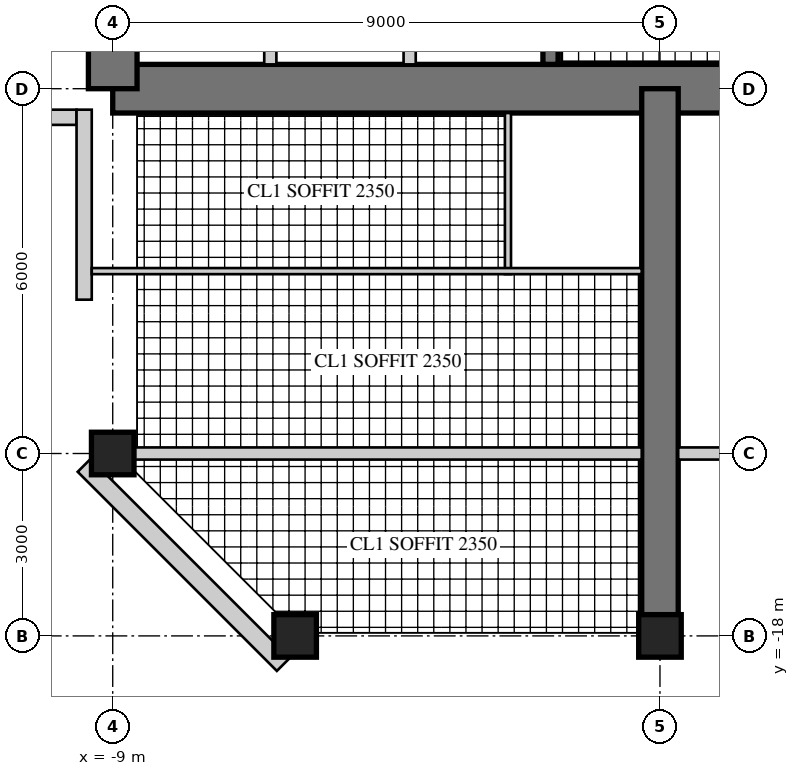
"""IFC4 building model, lengths in metres.
Left out: names, types, materials, properties, quantities, classifications, styles, units other than length and angle.
Written with IfcOpenShell. Run it as: python <this file> out.ifc"""

import sys

from ifc_helpers import new_model, si_unit, direction, frame, frame_2d, origin, origin_2d, place, context, subcontext, project, spatial, rectangle, hollow_rectangle, extrude, element, fill, save


model = new_model("IFC4")
c1 = context("Model", 3, precision=1e-05, world=origin(), true_north=direction((0.0, 1.0)))
c2 = subcontext(c1, "Body", "Model", "MODEL_VIEW")
j1 = project(units=[si_unit("LENGTHUNIT", "METRE"), si_unit("PLANEANGLEUNIT", "RADIAN")], contexts=[c1])
p1 = place(None, origin())
s1 = spatial("IfcSite", under=j1, at=p1, CompositionType="ELEMENT")
p2 = place(p1, origin())
s2 = spatial("IfcBuilding", under=s1, at=p2, CompositionType="ELEMENT")
p3 = place(p2, frame((0.0, 0.0, 261.1)))
s3 = spatial("IfcBuildingStorey", under=s2, at=p3, CompositionType="ELEMENT", Elevation=261.1)
p4 = place(p3, frame((-9.0, -9.0, 0.0), z_axis=(0.0, 0.0, 1.0), x_axis=(1.0, 0.0, 0.0)))
e1 = element("IfcWall", 1, at=p4, inside=s3, PredefinedType="SHEAR", context=c2, shape_type="SweptSolid", body=[
    extrude(rectangle(XDim=18.0, YDim=0.8, at=frame_2d((9.0, 0.0))), origin(), (0.0, 0.0, 1.0), 3.4),
])
p5 = place(p4, frame((9.8, 0.0, 0.0)))
e2 = element("IfcOpeningElement", 2, at=p5, cuts=e1, PredefinedType="OPENING", context=c2, shape_type="SweptSolid", body=[
    extrude(rectangle(XDim=1.0, YDim=2.4, at=frame_2d((0.5, 1.2))), frame((0.0, 0.41, 0.0), z_axis=(0.0, -1.0, 0.0), x_axis=(1.0, 0.0, 0.0)), (0.0, 0.0, 1.0), 0.82),
])
p6 = place(p3, frame((-9.0, 9.0, 0.0), z_axis=(0.0, 0.0, 1.0), x_axis=(0.0, -1.0, 0.0)))
e3 = element("IfcWall", 3, at=p6, inside=s3, PredefinedType="SHEAR", context=c2, shape_type="SweptSolid", body=[
    extrude(rectangle(XDim=18.0, YDim=0.8, at=frame_2d((9.0, 0.0))), origin(), (0.0, 0.0, 1.0), 3.4),
])
p7 = place(p6, frame((9.8, 0.0, 0.0)))
e4 = element("IfcOpeningElement", 4, at=p7, cuts=e3, PredefinedType="OPENING", context=c2, shape_type="SweptSolid", body=[
    extrude(rectangle(XDim=1.0, YDim=2.4, at=frame_2d((0.5, 1.2))), frame((0.0, 0.41, 0.0), z_axis=(0.0, -1.0, 0.0), x_axis=(1.0, 0.0, 0.0)), (0.0, 0.0, 1.0), 0.82),
])
p8 = place(p3, frame((-1.8, -1.875, 0.0), z_axis=(0.0, 0.0, 1.0), x_axis=(0.0, -1.0, 0.0)))
e5 = element("IfcWall", 5, at=p8, inside=s3, PredefinedType="SHEAR", context=c2, shape_type="SweptSolid", body=[
    extrude(rectangle(XDim=6.725, YDim=0.25, at=frame_2d((3.363, 0.0))), origin(), (0.0, 0.0, 1.0), 3.4),
])
p9 = place(p8, frame((1.875, 0.0, 0.0)))
e6 = element("IfcOpeningElement", 6, at=p9, cuts=e5, PredefinedType="OPENING", context=c2, shape_type="SweptSolid", body=[
    extrude(rectangle(XDim=1.6, YDim=2.4, at=frame_2d((0.8, 1.2))), frame((0.0, 0.135, 0.0), z_axis=(0.0, -1.0, 0.0), x_axis=(1.0, 0.0, 0.0)), (0.0, 0.0, 1.0), 0.27),
])
for number, where, z_axis, x_axis in (
    (7, (-4.117, -5.975, 0.0), (0.0, 0.0, 1.0), (0.0, -1.0, 0.0)),
    (8, (-6.408, -5.975, 0.0), (0.0, 0.0, 1.0), (0.0, -1.0, 0.0)),
):
    element("IfcWall", number, at=place(p3, frame(where, z_axis=z_axis, x_axis=x_axis)), inside=s3, PredefinedType="PARTITIONING", context=c2, shape_type="SweptSolid", body=[
        extrude(rectangle(XDim=2.625, YDim=0.2, at=frame_2d((1.312, 0.0))), origin(), (0.0, 0.0, 1.0), 3.4),
    ])
p10 = place(p3, frame((0.0, -9.0, 0.0), z_axis=(0.0, 0.0, 1.0), x_axis=(0.0, -1.0, 0.0)))
e9 = element("IfcWall", 9, at=p10, inside=s3, PredefinedType="SHEAR", context=c2, shape_type="SweptSolid", body=[
    extrude(rectangle(XDim=9.0, YDim=0.6, at=frame_2d((4.5, 0.0))), origin(), (0.0, 0.0, 1.0), 3.4),
])
p11 = place(p10, frame((3.8, 0.0, 0.0)))
e10 = element("IfcOpeningElement", 10, at=p11, cuts=e9, PredefinedType="OPENING", context=c2, shape_type="SweptSolid", body=[
    extrude(rectangle(XDim=1.0, YDim=2.15, at=frame_2d((0.5, 1.075))), frame((0.0, 0.31, 0.0), z_axis=(0.0, -1.0, 0.0), x_axis=(1.0, 0.0, 0.0)), (0.0, 0.0, 1.0), 0.62),
])
p12 = place(p10, frame((7.0, 0.0, 0.0)))
e11 = element("IfcOpeningElement", 11, at=p12, cuts=e9, PredefinedType="OPENING", context=c2, shape_type="SweptSolid", body=[
    extrude(rectangle(XDim=1.0, YDim=2.2, at=frame_2d((0.5, 1.1))), frame((0.0, 0.31, 0.0), z_axis=(0.0, -1.0, 0.0), x_axis=(1.0, 0.0, 0.0)), (0.0, 0.0, 1.0), 0.62),
])
for number, where, z_axis, x_axis in (
    (12, (-9.0, -15.0, 0.0), (0.0, 0.0, 1.0), (1.0, 0.0, 0.0)),
    (13, (-6.0, -18.0, 0.0), (0.0, 0.0, 1.0), (1.0, 0.0, 0.0)),
    (14, (0.0, -18.0, 0.0), (0.0, 0.0, 1.0), (1.0, 0.0, 0.0)),
):
    element("IfcColumn", number, at=place(p3, frame(where, z_axis=z_axis, x_axis=x_axis)), inside=s3, PredefinedType="COLUMN", context=c2, shape_type="SweptSolid", body=[
        extrude(rectangle(XDim=0.7, YDim=0.7, at=origin_2d()), origin(), (0.0, 0.0, 1.0), 3.4),
    ])
p13 = place(p3, frame((-12.47, -9.47, 0.0), z_axis=(0.0, 0.0, 1.0), x_axis=(1.0, 0.0, 0.0)))
e15 = element("IfcWall", 15, at=p13, inside=s3, PredefinedType="SOLIDWALL", context=c2, shape_type="SweptSolid", body=[
    extrude(rectangle(XDim=2.875, YDim=0.25, at=frame_2d((1.438, 0.0))), origin(), (0.0, 0.0, 1.0), 3.22),
])
p14 = place(p13, frame((0.6, 0.0, 0.0)))
e16 = element("IfcOpeningElement", 16, at=p14, cuts=e15, PredefinedType="OPENING", context=c2, shape_type="SweptSolid", body=[
    extrude(rectangle(XDim=1.0, YDim=2.2, at=frame_2d((0.5, 1.1))), frame((0.0, 0.135, 0.0), z_axis=(0.0, -1.0, 0.0), x_axis=(1.0, 0.0, 0.0)), (0.0, 0.0, 1.0), 0.27),
])
p15 = place(p3, frame((-9.47, -9.345, 0.0), z_axis=(0.0, 0.0, 1.0), x_axis=(0.0, -1.0, 0.0)))
e17 = element("IfcWall", 17, at=p15, inside=s3, PredefinedType="SOLIDWALL", context=c2, shape_type="SweptSolid", body=[
    extrude(rectangle(XDim=3.125, YDim=0.25, at=frame_2d((1.562, 0.0))), origin(), (0.0, 0.0, 1.0), 3.22),
])
p16 = place(p15, frame((0.6, 0.0, 0.0)))
e18 = element("IfcOpeningElement", 18, at=p16, cuts=e17, PredefinedType="OPENING", context=c2, shape_type="SweptSolid", body=[
    extrude(rectangle(XDim=1.0, YDim=2.2, at=frame_2d((0.5, 1.1))), frame((0.0, 0.135, 0.0), z_axis=(0.0, -1.0, 0.0), x_axis=(1.0, 0.0, 0.0)), (0.0, 0.0, 1.0), 0.27),
])
p17 = place(p3, frame((-9.47, -15.195, 0.0), z_axis=(0.0, 0.0, 1.0), x_axis=(0.707106781187, -0.707106781187, 0.0)))
e19 = element("IfcWall", 19, at=p17, inside=s3, PredefinedType="SOLIDWALL", context=c2, shape_type="SweptSolid", body=[
    extrude(rectangle(XDim=4.632, YDim=0.3, at=frame_2d((2.316, 0.0))), origin(), (0.0, 0.0, 1.0), 3.22),
])
p18 = place(p17, frame((1.866, 0.0, 0.3)))
e20 = element("IfcOpeningElement", 20, at=p18, cuts=e19, PredefinedType="OPENING", context=c2, shape_type="SweptSolid", body=[
    extrude(rectangle(XDim=0.9, YDim=2.4, at=frame_2d((0.45, 1.2))), frame((0.0, 0.16, 0.0), z_axis=(0.0, -1.0, 0.0), x_axis=(1.0, 0.0, 0.0)), (0.0, 0.0, 1.0), 0.32),
])
p19 = place(p3, frame((-2.5, -9.4, 0.0), z_axis=(0.0, 0.0, 1.0), x_axis=(0.0, -1.0, 0.0)))
e21 = element("IfcWall", 21, at=p19, inside=s3, PredefinedType="PARTITIONING", context=c2, shape_type="SweptSolid", body=[
    extrude(rectangle(XDim=2.65, YDim=0.1, at=frame_2d((1.325, 0.0))), origin(), (0.0, 0.0, 1.0), 3.22),
])
p20 = place(p3, frame((-9.345, -12.0, 0.0), z_axis=(0.0, 0.0, 1.0), x_axis=(1.0, 0.0, 0.0)))
e22 = element("IfcWall", 22, at=p20, inside=s3, PredefinedType="PARTITIONING", context=c2, shape_type="SweptSolid", body=[
    extrude(rectangle(XDim=9.045, YDim=0.1, at=frame_2d((4.522, 0.0))), origin(), (0.0, 0.0, 1.0), 3.22),
])
p21 = place(p20, frame((5.495, 0.0, 0.0)))
e23 = element("IfcOpeningElement", 23, at=p21, cuts=e22, PredefinedType="OPENING", context=c2, shape_type="SweptSolid", body=[
    extrude(rectangle(XDim=0.9, YDim=2.1, at=frame_2d((0.45, 1.05))), frame((0.0, 0.06, 0.0), z_axis=(0.0, -1.0, 0.0), x_axis=(1.0, 0.0, 0.0)), (0.0, 0.0, 1.0), 0.12),
])
p22 = place(p20, frame((7.595, 0.0, 0.0)))
e24 = element("IfcOpeningElement", 24, at=p22, cuts=e22, PredefinedType="OPENING", context=c2, shape_type="SweptSolid", body=[
    extrude(rectangle(XDim=0.9, YDim=2.1, at=frame_2d((0.45, 1.05))), frame((0.0, 0.06, 0.0), z_axis=(0.0, -1.0, 0.0), x_axis=(1.0, 0.0, 0.0)), (0.0, 0.0, 1.0), 0.12),
])
p23 = place(p3, frame((-8.65, -15.0, 0.0), z_axis=(0.0, 0.0, 1.0), x_axis=(1.0, 0.0, 0.0)))
e25 = element("IfcWall", 25, at=p23, inside=s3, PredefinedType="SOLIDWALL", context=c2, shape_type="SweptSolid", body=[
    extrude(rectangle(XDim=8.35, YDim=0.2, at=frame_2d((4.175, 0.0))), origin(), (0.0, 0.0, 1.0), 2.52),
])
p24 = place(p3, frame((0.3, -15.0, 0.0), z_axis=(0.0, 0.0, 1.0), x_axis=(1.0, 0.0, 0.0)))
e26 = element("IfcWall", 26, at=p24, inside=s3, PredefinedType="SOLIDWALL", context=c2, shape_type="SweptSolid", body=[
    extrude(rectangle(XDim=8.35, YDim=0.2, at=frame_2d((4.175, 0.0))), origin(), (0.0, 0.0, 1.0), 2.52),
])
p25 = place(p24, frame((0.4, 0.0, 0.0)))
e27 = element("IfcOpeningElement", 27, at=p25, cuts=e26, PredefinedType="OPENING", context=c2, shape_type="SweptSolid", body=[
    extrude(rectangle(XDim=1.0, YDim=2.2, at=frame_2d((0.5, 1.1))), frame((0.0, 0.11, 0.0), z_axis=(0.0, -1.0, 0.0), x_axis=(1.0, 0.0, 0.0)), (0.0, 0.0, 1.0), 0.22),
])
p26 = place(p16, origin())
e28 = element("IfcDoor", 28, at=p26, inside=s3, OperationType="SINGLE_SWING_LEFT", PredefinedType="DOOR", context=c2, shape_type="SweptSolid", body=[
    extrude(hollow_rectangle(XDim=1.0, YDim=2.2, WallThickness=0.06, at=frame_2d((0.5, 1.1))), frame((0.0, 0.025, 0.0), z_axis=(0.0, -1.0, 0.0), x_axis=(1.0, 0.0, 0.0)), (0.0, 0.0, 1.0), 0.05),
    extrude(rectangle(XDim=0.879, YDim=2.079, at=frame_2d((0.5, 1.1))), frame((0.0, 0.025, 0.0), z_axis=(0.0, -1.0, 0.0), x_axis=(1.0, 0.0, 0.0)), (0.0, 0.0, 1.0), 0.05),
])
fill(e18, e28)
p27 = place(p18, origin())
e29 = element("IfcWindow", 29, at=p27, inside=s3, PartitioningType="SINGLE_PANEL", PredefinedType="WINDOW", context=c2, shape_type="SweptSolid", body=[
    extrude(hollow_rectangle(XDim=0.9, YDim=2.4, WallThickness=0.06, at=frame_2d((0.45, 1.2))), frame((0.0, 0.03, 0.0), z_axis=(0.0, -1.0, 0.0), x_axis=(1.0, 0.0, 0.0)), (0.0, 0.0, 1.0), 0.06),
    extrude(rectangle(XDim=0.779, YDim=2.279, at=frame_2d((0.45, 1.2))), frame((0.0, 0.03, 0.0), z_axis=(0.0, -1.0, 0.0), x_axis=(1.0, 0.0, 0.0)), (0.0, 0.0, 1.0), 0.06),
])
fill(e20, e29)
p28 = place(p21, origin())
e30 = element("IfcDoor", 30, at=p28, inside=s3, OperationType="SINGLE_SWING_RIGHT", PredefinedType="DOOR", context=c2, shape_type="SweptSolid", body=[
    extrude(rectangle(XDim=0.9, YDim=2.1, at=frame_2d((0.45, 1.05))), frame((0.0, 0.025, 0.0), z_axis=(0.0, -1.0, 0.0), x_axis=(1.0, 0.0, 0.0)), (0.0, 0.0, 1.0), 0.05),
])
fill(e23, e30)
p29 = place(p22, origin())
e31 = element("IfcDoor", 31, at=p29, inside=s3, OperationType="SINGLE_SWING_RIGHT", PredefinedType="DOOR", context=c2, shape_type="SweptSolid", body=[
    extrude(rectangle(XDim=0.9, YDim=2.1, at=frame_2d((0.45, 1.05))), frame((0.0, 0.025, 0.0), z_axis=(0.0, -1.0, 0.0), x_axis=(1.0, 0.0, 0.0)), (0.0, 0.0, 1.0), 0.05),
])
fill(e24, e31)
p30 = place(p25, frame((1.0, 0.0, 0.0), z_axis=(0.0, 0.0, 1.0), x_axis=(-1.0, 0.0, 0.0)))
e32 = element("IfcDoor", 32, at=p30, inside=s3, OperationType="SINGLE_SWING_LEFT", PredefinedType="DOOR", context=c2, shape_type="SweptSolid", body=[
    extrude(rectangle(XDim=1.0, YDim=2.2, at=frame_2d((0.5, 1.1))), frame((0.0, 0.025, 0.0), z_axis=(0.0, -1.0, 0.0), x_axis=(1.0, 0.0, 0.0)), (0.0, 0.0, 1.0), 0.05),
])
fill(e27, e32)
p31 = place(p11, frame((1.0, 0.0, 0.0), z_axis=(0.0, 0.0, 1.0), x_axis=(-1.0, 0.0, 0.0)))
e33 = element("IfcDoor", 33, at=p31, inside=s3, OperationType="SINGLE_SWING_RIGHT", PredefinedType="DOOR", context=c2, shape_type="SweptSolid", body=[
    extrude(rectangle(XDim=1.0, YDim=2.15, at=frame_2d((0.5, 1.075))), frame((0.0, 0.025, 0.0), z_axis=(0.0, -1.0, 0.0), x_axis=(1.0, 0.0, 0.0)), (0.0, 0.0, 1.0), 0.05),
])
fill(e10, e33)
p32 = place(p12, origin())
e34 = element("IfcDoor", 34, at=p32, inside=s3, OperationType="SINGLE_SWING_LEFT", PredefinedType="DOOR", context=c2, shape_type="SweptSolid", body=[
    extrude(rectangle(XDim=1.0, YDim=2.2, at=frame_2d((0.5, 1.1))), frame((0.0, 0.025, 0.0), z_axis=(0.0, -1.0, 0.0), x_axis=(1.0, 0.0, 0.0)), (0.0, 0.0, 1.0), 0.05),
])
fill(e11, e34)
p33 = place(p5, origin())
e35 = element("IfcDoor", 35, at=p33, inside=s3, OperationType="SINGLE_SWING_RIGHT", PredefinedType="DOOR", context=c2, shape_type="SweptSolid", body=[
    extrude(rectangle(XDim=1.0, YDim=2.4, at=frame_2d((0.5, 1.2))), frame((0.0, 0.055, 0.0), z_axis=(0.0, -1.0, 0.0), x_axis=(1.0, 0.0, 0.0)), (0.0, 0.0, 1.0), 0.05),
])
fill(e2, e35)
save(model, sys.argv[1])
